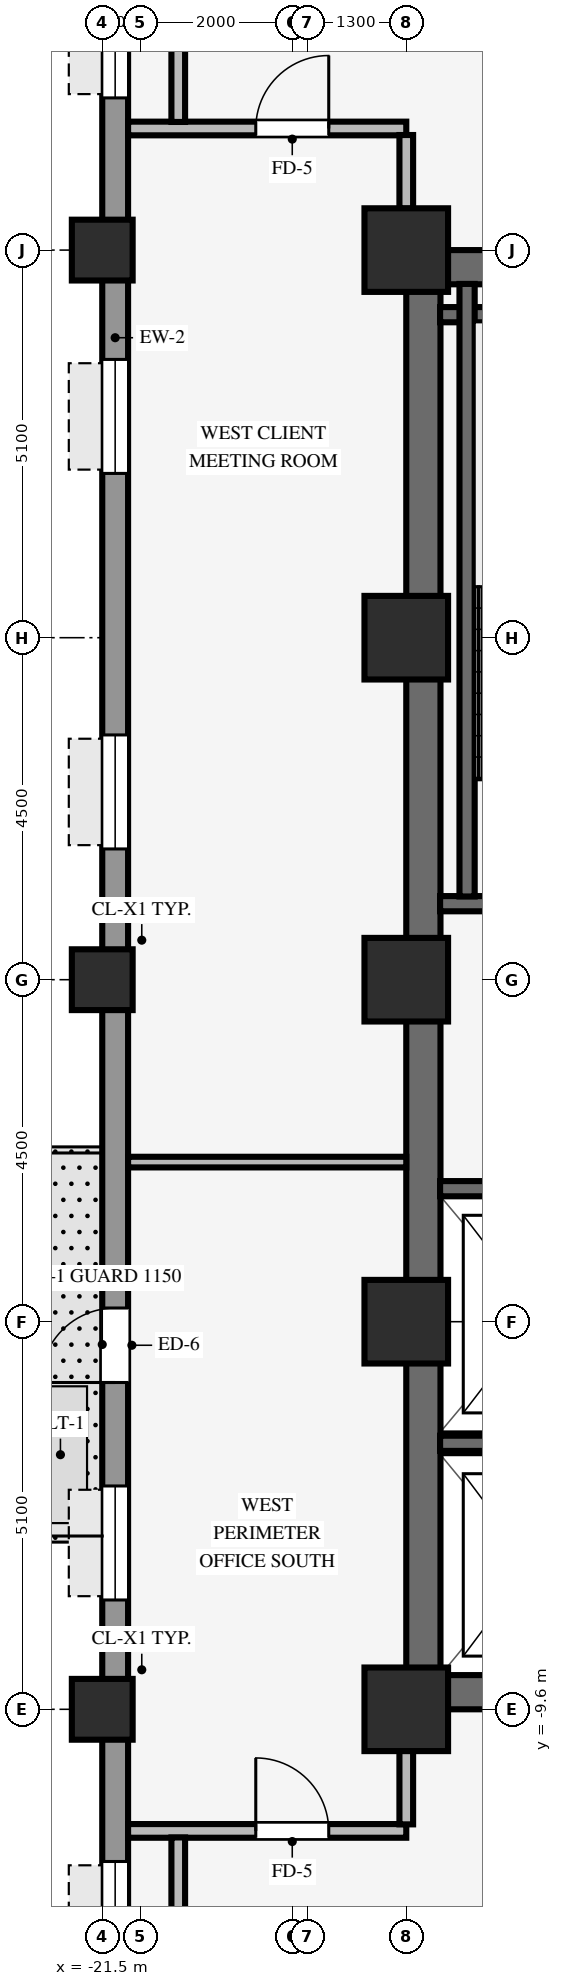
"""IFC4 building model, lengths in metres.
Left out: names, types, materials, properties, quantities, classifications, styles, units other than length and angle.
Written with IfcOpenShell. Run it as: python <this file> out.ifc"""

import sys

from ifc_helpers import new_model, si_unit, direction, frame, frame_2d, origin, origin_2d, place, context, subcontext, project, spatial, rectangle, hollow_rectangle, extrude, source, transform, mapped, element, fill, save


model = new_model("IFC4")
c1 = context("Model", 3, precision=1e-05, world=origin(), true_north=direction((0.0, 1.0)))
c2 = subcontext(c1, "Body", "Model", "MODEL_VIEW")
j1 = project(units=[si_unit("LENGTHUNIT", "METRE"), si_unit("PLANEANGLEUNIT", "RADIAN")], contexts=[c1])
p1 = place(None, origin())
s1 = spatial("IfcSite", under=j1, at=p1, CompositionType="ELEMENT")
p2 = place(p1, origin())
s2 = spatial("IfcBuilding", under=s1, at=p2, CompositionType="ELEMENT")
p3 = place(p2, frame((0.0, 0.0, 75.05)))
s3 = spatial("IfcBuildingStorey", under=s2, at=p3, CompositionType="ELEMENT", Elevation=75.05)
for number, where, z_axis, x_axis in (
    (1, (-17.5, -9.375, 0.0), (0.0, 0.0, 1.0), (1.0, 0.0, 0.0)),
    (2, (-17.5, 9.375, 0.0), (0.0, 0.0, 1.0), (1.0, 0.0, 0.0)),
):
    element("IfcWall", number, at=place(p3, frame(where, z_axis=z_axis, x_axis=x_axis)), inside=s3, PredefinedType="SHEAR", context=c2, shape_type="SweptSolid", body=[
        extrude(rectangle(XDim=8.5, YDim=0.45, at=frame_2d((4.25, 0.0))), origin(), (0.0, 0.0, 1.0), 3.37),
    ])
p4 = place(p3, frame((-17.275, -9.155, 0.0), z_axis=(0.0, 0.0, 1.0), x_axis=(0.0, 1.0, 0.0)))
e3 = element("IfcWall", 3, at=p4, inside=s3, PredefinedType="SHEAR", context=c2, shape_type="SweptSolid", body=[
    extrude(rectangle(XDim=18.31, YDim=0.45, at=frame_2d((9.155, 0.0))), origin(), (0.0, 0.0, 1.0), 3.37),
])
for number, where, z_axis, x_axis in (
    (4, (-17.5, -9.6, 0.0), (0.0, 0.0, 1.0), (1.0, 0.0, 0.0)),
    (5, (-17.5, -4.5, 0.0), (0.0, 0.0, 1.0), (1.0, 0.0, 0.0)),
    (6, (-17.5, 4.5, 0.0), (0.0, 0.0, 1.0), (1.0, 0.0, 0.0)),
    (7, (-17.5, 9.6, 0.0), (0.0, 0.0, 1.0), (1.0, 0.0, 0.0)),
    (8, (-17.5, 0.0, 0.0), (0.0, 0.0, 1.0), (1.0, 0.0, 0.0)),
):
    element("IfcColumn", number, at=place(p3, frame(where, z_axis=z_axis, x_axis=x_axis)), inside=s3, PredefinedType="COLUMN", context=c2, shape_type="SweptSolid", body=[
        extrude(rectangle(XDim=1.1, YDim=1.1, at=origin_2d()), origin(), (0.0, 0.0, 1.0), 3.37),
    ])
for number, where, z_axis, x_axis in (
    (9, (-21.5, -9.6, 0.0), (0.0, 0.0, 1.0), (1.0, 0.0, 0.0)),
    (10, (-21.5, 0.0, 0.0), (0.0, 0.0, 1.0), (1.0, 0.0, 0.0)),
    (11, (-21.5, 9.6, 0.0), (0.0, 0.0, 1.0), (1.0, 0.0, 0.0)),
):
    element("IfcColumn", number, at=place(p3, frame(where, z_axis=z_axis, x_axis=x_axis)), inside=s3, PredefinedType="COLUMN", context=c2, shape_type="SweptSolid", body=[
        extrude(hollow_rectangle(XDim=0.8, YDim=0.8, WallThickness=0.055, InnerFilletRadius=0.055, OuterFilletRadius=0.11, at=origin_2d()), origin(), (0.0, 0.0, 1.0), 3.37),
    ])
p5 = place(p3, frame((-21.33, -20.764, 0.0), z_axis=(0.0, 0.0, 1.0), x_axis=(0.0, 1.0, 0.0)))
e12 = element("IfcWall", 12, at=p5, inside=s3, PredefinedType="STANDARD", context=c2, shape_type="SweptSolid", body=[
    extrude(rectangle(XDim=41.528, YDim=0.34, at=frame_2d((20.764, 0.0))), origin(), (0.0, 0.0, 1.0), 2.705),
])
p6 = place(p5, frame((15.464, 0.0, 0.0)))
e13 = element("IfcOpeningElement", 13, at=p6, cuts=e12, PredefinedType="OPENING", context=c2, shape_type="SweptSolid", body=[
    extrude(rectangle(XDim=0.98, YDim=2.15, at=frame_2d((0.49, 1.075))), frame((0.0, 0.18, 0.0), z_axis=(0.0, -1.0, 0.0), x_axis=(1.0, 0.0, 0.0)), (0.0, 0.0, 1.0), 0.36),
])
p7 = place(p5, frame((1.371, 0.0, 0.8)))
e14 = element("IfcOpeningElement", 14, at=p7, cuts=e12, PredefinedType="OPENING", context=c2, shape_type="SweptSolid", body=[
    extrude(rectangle(XDim=1.5, YDim=1.6, at=frame_2d((0.75, 0.8))), frame((0.0, 0.18, 0.0), z_axis=(0.0, -1.0, 0.0), x_axis=(1.0, 0.0, 0.0)), (0.0, 0.0, 1.0), 0.36),
])
p8 = place(p5, frame((7.662, 0.0, 0.8)))
e15 = element("IfcOpeningElement", 15, at=p8, cuts=e12, PredefinedType="OPENING", context=c2, shape_type="SweptSolid", body=[
    extrude(rectangle(XDim=1.5, YDim=1.6, at=frame_2d((0.75, 0.8))), frame((0.0, 0.18, 0.0), z_axis=(0.0, -1.0, 0.0), x_axis=(1.0, 0.0, 0.0)), (0.0, 0.0, 1.0), 0.36),
])
p9 = place(p5, frame((12.603, 0.0, 0.8)))
e16 = element("IfcOpeningElement", 16, at=p9, cuts=e12, PredefinedType="OPENING", context=c2, shape_type="SweptSolid", body=[
    extrude(rectangle(XDim=1.5, YDim=1.6, at=frame_2d((0.75, 0.8))), frame((0.0, 0.18, 0.0), z_axis=(0.0, -1.0, 0.0), x_axis=(1.0, 0.0, 0.0)), (0.0, 0.0, 1.0), 0.36),
])
p10 = place(p5, frame((22.485, 0.0, 0.8)))
e17 = element("IfcOpeningElement", 17, at=p10, cuts=e12, PredefinedType="OPENING", context=c2, shape_type="SweptSolid", body=[
    extrude(rectangle(XDim=1.5, YDim=1.6, at=frame_2d((0.75, 0.8))), frame((0.0, 0.18, 0.0), z_axis=(0.0, -1.0, 0.0), x_axis=(1.0, 0.0, 0.0)), (0.0, 0.0, 1.0), 0.36),
])
p11 = place(p5, frame((27.426, 0.0, 0.8)))
e18 = element("IfcOpeningElement", 18, at=p11, cuts=e12, PredefinedType="OPENING", context=c2, shape_type="SweptSolid", body=[
    extrude(rectangle(XDim=1.5, YDim=1.6, at=frame_2d((0.75, 0.8))), frame((0.0, 0.18, 0.0), z_axis=(0.0, -1.0, 0.0), x_axis=(1.0, 0.0, 0.0)), (0.0, 0.0, 1.0), 0.36),
])
p12 = place(p5, frame((32.366, 0.0, 0.8)))
e19 = element("IfcOpeningElement", 19, at=p12, cuts=e12, PredefinedType="OPENING", context=c2, shape_type="SweptSolid", body=[
    extrude(rectangle(XDim=1.5, YDim=1.6, at=frame_2d((0.75, 0.8))), frame((0.0, 0.18, 0.0), z_axis=(0.0, -1.0, 0.0), x_axis=(1.0, 0.0, 0.0)), (0.0, 0.0, 1.0), 0.36),
])
p13 = place(p5, frame((38.657, 0.0, 0.8)))
e20 = element("IfcOpeningElement", 20, at=p13, cuts=e12, PredefinedType="OPENING", context=c2, shape_type="SweptSolid", body=[
    extrude(rectangle(XDim=1.5, YDim=1.6, at=frame_2d((0.75, 0.8))), frame((0.0, 0.18, 0.0), z_axis=(0.0, -1.0, 0.0), x_axis=(1.0, 0.0, 0.0)), (0.0, 0.0, 1.0), 0.36),
])
for number, where, z_axis, x_axis in (
    (21, (-17.055, 1.0, 0.0), (0.0, 0.0, 1.0), (1.0, 0.0, 0.0)),
    (22, (-17.055, 8.75, 0.0), (0.0, 0.0, 1.0), (1.0, 0.0, 0.0)),
):
    element("IfcWall", number, at=place(p3, frame(where, z_axis=z_axis, x_axis=x_axis)), inside=s3, PredefinedType="SHEAR", context=c2, shape_type="SweptSolid", body=[
        extrude(rectangle(XDim=3.52, YDim=0.2, at=frame_2d((1.76, 0.0))), origin(), (0.0, 0.0, 1.0), 3.37),
    ])
p14 = place(p3, frame((-16.7, 1.095, 0.0), z_axis=(0.0, 0.0, 1.0), x_axis=(0.0, 1.0, 0.0)))
e23 = element("IfcWall", 23, at=p14, inside=s3, PredefinedType="SHEAR", context=c2, shape_type="SweptSolid", body=[
    extrude(rectangle(XDim=8.06, YDim=0.2, at=frame_2d((4.03, 0.0))), origin(), (0.0, 0.0, 1.0), 3.37),
])
p15 = place(p3, frame((-17.055, -6.1, 0.0), z_axis=(0.0, 0.0, 1.0), x_axis=(1.0, 0.0, 0.0)))
e24 = element("IfcWall", 24, at=p15, inside=s3, PredefinedType="SHEAR", context=c2, shape_type="SweptSolid", body=[
    extrude(rectangle(XDim=2.805, YDim=0.2, at=frame_2d((1.402, 0.0))), origin(), (0.0, 0.0, 1.0), 3.37),
])
p16 = place(p3, frame((-17.055, -2.75, 0.0), z_axis=(0.0, 0.0, 1.0), x_axis=(1.0, 0.0, 0.0)))
e25 = element("IfcWall", 25, at=p16, inside=s3, PredefinedType="SHEAR", context=c2, shape_type="SweptSolid", body=[
    extrude(rectangle(XDim=2.61, YDim=0.2, at=frame_2d((1.305, 0.0))), origin(), (0.0, 0.0, 1.0), 3.37),
])
p17 = place(p3, frame((-21.16, -11.2, 0.0), z_axis=(0.0, 0.0, 1.0), x_axis=(1.0, 0.0, 0.0)))
e26 = element("IfcWall", 26, at=p17, inside=s3, PredefinedType="PARTITIONING", context=c2, shape_type="SweptSolid", body=[
    extrude(rectangle(XDim=3.66, YDim=0.18, at=frame_2d((1.83, 0.0))), origin(), (0.0, 0.0, 1.0), 3.36),
])
p18 = place(p17, frame((1.68, 0.0, 0.0)))
e27 = element("IfcOpeningElement", 27, at=p18, cuts=e26, PredefinedType="OPENING", context=c2, shape_type="SweptSolid", body=[
    extrude(rectangle(XDim=0.96, YDim=2.1, at=frame_2d((0.48, 1.05))), frame((0.0, 0.1, 0.0), z_axis=(0.0, -1.0, 0.0), x_axis=(1.0, 0.0, 0.0)), (0.0, 0.0, 1.0), 0.2),
])
p19 = place(p3, frame((-21.16, -2.4, 0.0), z_axis=(0.0, 0.0, 1.0), x_axis=(1.0, 0.0, 0.0)))
e28 = element("IfcWall", 28, at=p19, inside=s3, PredefinedType="PARTITIONING", context=c2, shape_type="SweptSolid", body=[
    extrude(rectangle(XDim=3.66, YDim=0.14, at=frame_2d((1.83, 0.0))), origin(), (0.0, 0.0, 1.0), 3.36),
])
p20 = place(p3, frame((-21.16, 11.2, 0.0), z_axis=(0.0, 0.0, 1.0), x_axis=(1.0, 0.0, 0.0)))
e29 = element("IfcWall", 29, at=p20, inside=s3, PredefinedType="PARTITIONING", context=c2, shape_type="SweptSolid", body=[
    extrude(rectangle(XDim=3.66, YDim=0.18, at=frame_2d((1.83, 0.0))), origin(), (0.0, 0.0, 1.0), 3.36),
])
p21 = place(p20, frame((1.68, 0.0, 0.0)))
e30 = element("IfcOpeningElement", 30, at=p21, cuts=e29, PredefinedType="OPENING", context=c2, shape_type="SweptSolid", body=[
    extrude(rectangle(XDim=0.96, YDim=2.1, at=frame_2d((0.48, 1.05))), frame((0.0, 0.1, 0.0), z_axis=(0.0, -1.0, 0.0), x_axis=(1.0, 0.0, 0.0)), (0.0, 0.0, 1.0), 0.2),
])
for number, where, z_axis, x_axis in (
    (31, (-20.5, -13.514, 0.0), (0.0, 0.0, 1.0), (0.0, 1.0, 0.0)),
    (32, (-20.5, 11.286, 0.0), (0.0, 0.0, 1.0), (0.0, 1.0, 0.0)),
):
    element("IfcWall", number, at=place(p3, frame(where, z_axis=z_axis, x_axis=x_axis)), inside=s3, PredefinedType="PARTITIONING", context=c2, shape_type="SweptSolid", body=[
        extrude(rectangle(XDim=2.228, YDim=0.18, at=frame_2d((1.114, 0.0))), origin(), (0.0, 0.0, 1.0), 3.36),
    ])
for number, where, z_axis, x_axis in (
    (33, (-17.5, -11.114, 0.0), (0.0, 0.0, 1.0), (0.0, 1.0, 0.0)),
    (34, (-17.5, 10.146, 0.0), (0.0, 0.0, 1.0), (0.0, 1.0, 0.0)),
):
    element("IfcWall", number, at=place(p3, frame(where, z_axis=z_axis, x_axis=x_axis)), inside=s3, PredefinedType="PARTITIONING", context=c2, shape_type="SweptSolid", body=[
        extrude(rectangle(XDim=0.968, YDim=0.18, at=frame_2d((0.484, 0.0))), origin(), (0.0, 0.0, 1.0), 2.738),
    ])
m1 = source(origin(), c2, "Body", "SweptSolid", [
    extrude(rectangle(XDim=0.98, YDim=2.15, at=frame_2d((0.49, 1.075))), frame((0.0, 0.025, 0.0), z_axis=(0.0, -1.0, 0.0), x_axis=(1.0, 0.0, 0.0)), (0.0, 0.0, 1.0), 0.05),
])
p22 = place(p6, origin())
e35 = element("IfcDoor", 35, at=p22, inside=s3, OperationType="SINGLE_SWING_LEFT", PredefinedType="DOOR", context=c2, shape_type="MappedRepresentation", body=[
    mapped(m1, transform((0.0, 0.0, 0.0), scale=1.0)),
])
fill(e13, e35)
m2 = source(origin(), c2, "Body", "SweptSolid", [
    extrude(rectangle(XDim=1.5, YDim=1.6, at=frame_2d((0.75, 0.8))), frame((0.0, 0.03, 0.0), z_axis=(0.0, -1.0, 0.0), x_axis=(1.0, 0.0, 0.0)), (0.0, 0.0, 1.0), 0.06),
])
p23 = place(p8, origin())
e36 = element("IfcWindow", 36, at=p23, inside=s3, PartitioningType="SINGLE_PANEL", PredefinedType="WINDOW", context=c2, shape_type="MappedRepresentation", body=[
    mapped(m2, transform((0.0, 0.0, 0.0), scale=1.0)),
])
fill(e15, e36)
p24 = place(p9, origin())
e37 = element("IfcWindow", 37, at=p24, inside=s3, PartitioningType="SINGLE_PANEL", PredefinedType="WINDOW", context=c2, shape_type="MappedRepresentation", body=[
    mapped(m2, transform((0.0, 0.0, 0.0), scale=1.0)),
])
fill(e16, e37)
p25 = place(p10, origin())
e38 = element("IfcWindow", 38, at=p25, inside=s3, PartitioningType="SINGLE_PANEL", PredefinedType="WINDOW", context=c2, shape_type="MappedRepresentation", body=[
    mapped(m2, transform((0.0, 0.0, 0.0), scale=1.0)),
])
fill(e17, e38)
p26 = place(p11, origin())
e39 = element("IfcWindow", 39, at=p26, inside=s3, PartitioningType="SINGLE_PANEL", PredefinedType="WINDOW", context=c2, shape_type="MappedRepresentation", body=[
    mapped(m2, transform((0.0, 0.0, 0.0), scale=1.0)),
])
fill(e18, e39)
p27 = place(p12, origin())
e40 = element("IfcWindow", 40, at=p27, inside=s3, PartitioningType="SINGLE_PANEL", PredefinedType="WINDOW", context=c2, shape_type="MappedRepresentation", body=[
    mapped(m2, transform((0.0, 0.0, 0.0), scale=1.0)),
])
fill(e19, e40)
m3 = source(origin(), c2, "Body", "SweptSolid", [
    extrude(rectangle(XDim=0.96, YDim=2.1, at=frame_2d((0.48, 1.05))), frame((0.0, 0.025, 0.0), z_axis=(0.0, -1.0, 0.0), x_axis=(1.0, 0.0, 0.0)), (0.0, 0.0, 1.0), 0.05),
])
p28 = place(p18, origin())
e41 = element("IfcDoor", 41, at=p28, inside=s3, OperationType="SINGLE_SWING_LEFT", PredefinedType="DOOR", context=c2, shape_type="MappedRepresentation", body=[
    mapped(m3, transform((0.0, 0.0, 0.0), scale=1.0)),
])
fill(e27, e41)
p29 = place(p21, origin())
e42 = element("IfcDoor", 42, at=p29, inside=s3, OperationType="SINGLE_SWING_RIGHT", PredefinedType="DOOR", context=c2, shape_type="MappedRepresentation", body=[
    mapped(m3, transform((0.0, 0.0, 0.0), scale=1.0)),
])
fill(e30, e42)
save(model, sys.argv[1])
